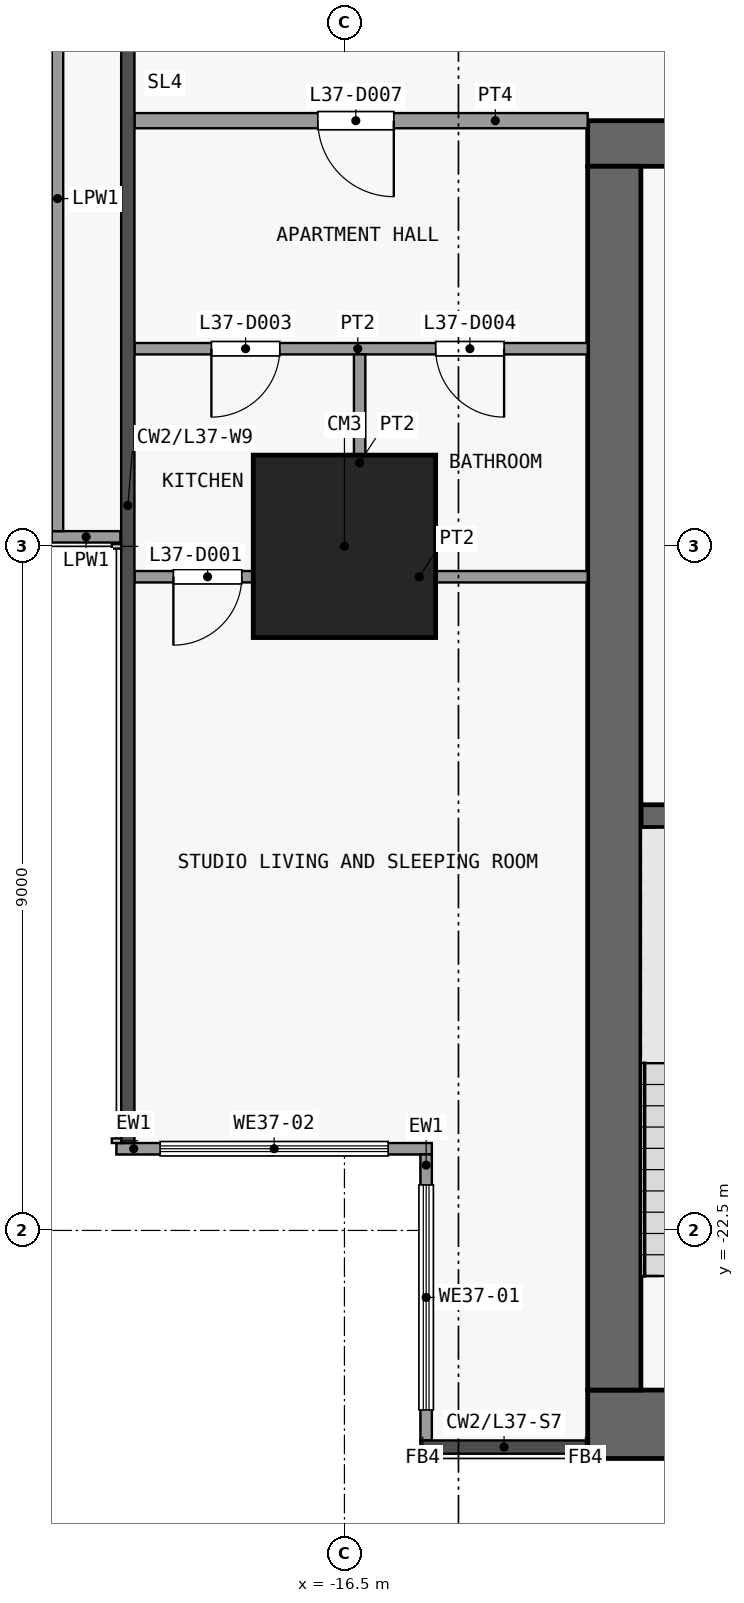
"""IFC4 building model, lengths in metres.
Left out: names, types, materials, properties, quantities, classifications, styles, units other than length and angle.
Written with IfcOpenShell. Run it as: python <this file> out.ifc"""

import sys

from ifc_helpers import new_model, si_unit, direction, frame, frame_2d, origin, origin_2d, place, context, subcontext, project, spatial, rectangle, extrude, element, fill, save


model = new_model("IFC4")
c1 = context("Model", 3, precision=1e-05, world=origin(), true_north=direction((0.0, 1.0)))
c2 = subcontext(c1, "Body", "Model", "MODEL_VIEW")
j1 = project(units=[si_unit("LENGTHUNIT", "METRE"), si_unit("PLANEANGLEUNIT", "RADIAN")], contexts=[c1])
p1 = place(None, origin())
s1 = spatial("IfcSite", under=j1, at=p1, CompositionType="ELEMENT")
p2 = place(p1, origin())
s2 = spatial("IfcBuilding", under=s1, at=p2, CompositionType="ELEMENT")
p3 = place(p2, frame((0.0, 0.0, 152.9)))
s3 = spatial("IfcBuildingStorey", under=s2, at=p3, CompositionType="ELEMENT", Elevation=152.9)
p4 = place(p3, frame((-16.5, -13.5, 0.0), z_axis=(0.0, 0.0, 1.0), x_axis=(1.0, 0.0, 0.0)))
e1 = element("IfcColumn", 1, at=p4, inside=s3, PredefinedType="COLUMN", context=c2, shape_type="SweptSolid", body=[
    extrude(rectangle(XDim=2.4, YDim=2.4, at=origin_2d()), origin(), (0.0, 0.0, 1.0), 3.6),
])
p5 = place(p3, frame((-13.3, -25.05, 0.0), z_axis=(0.0, 0.0, 1.0), x_axis=(1.0, 0.0, 0.0)))
e2 = element("IfcWall", 2, at=p5, inside=s3, PredefinedType="SHEAR", context=c2, shape_type="SweptSolid", body=[
    extrude(rectangle(XDim=26.6, YDim=0.9, at=frame_2d((13.3, 0.0))), origin(), (0.0, 0.0, 1.0), 3.3),
])
p6 = place(p3, frame((-13.3, -8.2, 0.0), z_axis=(0.0, 0.0, 1.0), x_axis=(1.0, 0.0, 0.0)))
e3 = element("IfcWall", 3, at=p6, inside=s3, PredefinedType="SHEAR", context=c2, shape_type="SweptSolid", body=[
    extrude(rectangle(XDim=26.6, YDim=0.6, at=frame_2d((13.3, 0.0))), origin(), (0.0, 0.0, 1.0), 3.3),
])
p7 = place(p6, frame((7.6, 0.0, 0.0)))
e4 = element("IfcOpeningElement", 4, at=p7, cuts=e3, PredefinedType="OPENING", context=c2, shape_type="SweptSolid", body=[
    extrude(rectangle(XDim=1.8, YDim=2.1, at=frame_2d((0.9, 1.05))), frame((0.0, 0.31, 0.0), z_axis=(0.0, -1.0, 0.0), x_axis=(1.0, 0.0, 0.0)), (0.0, 0.0, 1.0), 0.62),
])
p8 = place(p6, frame((17.2, 0.0, 0.0)))
e5 = element("IfcOpeningElement", 5, at=p8, cuts=e3, PredefinedType="OPENING", context=c2, shape_type="SweptSolid", body=[
    extrude(rectangle(XDim=1.8, YDim=2.1, at=frame_2d((0.9, 1.05))), frame((0.0, 0.31, 0.0), z_axis=(0.0, -1.0, 0.0), x_axis=(1.0, 0.0, 0.0)), (0.0, 0.0, 1.0), 0.62),
])
p9 = place(p6, frame((1.525, 0.0, 0.0)))
e6 = element("IfcOpeningElement", 6, at=p9, cuts=e3, PredefinedType="OPENING", context=c2, shape_type="SweptSolid", body=[
    extrude(rectangle(XDim=1.2, YDim=2.1, at=frame_2d((0.6, 1.05))), frame((0.0, 0.31, 0.0), z_axis=(0.0, -1.0, 0.0), x_axis=(1.0, 0.0, 0.0)), (0.0, 0.0, 1.0), 0.62),
])
p10 = place(p6, frame((23.175, 0.0, 0.0)))
e7 = element("IfcOpeningElement", 7, at=p10, cuts=e3, PredefinedType="OPENING", context=c2, shape_type="SweptSolid", body=[
    extrude(rectangle(XDim=0.9, YDim=2.1, at=frame_2d((0.45, 1.05))), frame((0.0, 0.31, 0.0), z_axis=(0.0, -1.0, 0.0), x_axis=(1.0, 0.0, 0.0)), (0.0, 0.0, 1.0), 0.62),
])
p11 = place(p3, frame((-12.95, -24.6, 0.0), z_axis=(0.0, 0.0, 1.0), x_axis=(0.0, 1.0, 0.0)))
e8 = element("IfcWall", 8, at=p11, inside=s3, PredefinedType="SHEAR", context=c2, shape_type="SweptSolid", body=[
    extrude(rectangle(XDim=16.1, YDim=0.7, at=frame_2d((8.05, 0.0))), origin(), (0.0, 0.0, 1.0), 3.3),
])
p12 = place(p3, frame((-12.6, -17.05, 0.0), z_axis=(0.0, 0.0, 1.0), x_axis=(1.0, 0.0, 0.0)))
e9 = element("IfcWall", 9, at=p12, inside=s3, PredefinedType="SHEAR", context=c2, shape_type="SweptSolid", body=[
    extrude(rectangle(XDim=3.1, YDim=0.3, at=frame_2d((1.55, 0.0))), origin(), (0.0, 0.0, 1.0), 3.3),
])
p13 = place(p3, frame((-15.425, -25.262, 0.0), z_axis=(0.0, 0.0, 1.0), x_axis=(0.0, 1.0, 0.0)))
e10 = element("IfcWall", 10, at=p13, inside=s3, PredefinedType="SOLIDWALL", context=c2, shape_type="SweptSolid", body=[
    extrude(rectangle(XDim=3.762, YDim=0.15, at=frame_2d((1.881, 0.0))), origin(), (0.0, 0.0, 1.0), 3.3),
])
p14 = place(p13, frame((0.401, 0.0, 0.9)))
e11 = element("IfcOpeningElement", 11, at=p14, cuts=e10, PredefinedType="OPENING", context=c2, shape_type="SweptSolid", body=[
    extrude(rectangle(XDim=2.96, YDim=2.4, at=frame_2d((1.48, 1.2))), frame((0.0, 0.085, 0.0), z_axis=(0.0, -1.0, 0.0), x_axis=(1.0, 0.0, 0.0)), (0.0, 0.0, 1.0), 0.17),
])
p15 = place(p3, frame((-15.35, -21.425, 0.0), z_axis=(0.0, 0.0, 1.0), x_axis=(-1.0, 0.0, 0.0)))
e12 = element("IfcWall", 12, at=p15, inside=s3, PredefinedType="SOLIDWALL", context=c2, shape_type="SweptSolid", body=[
    extrude(rectangle(XDim=4.15, YDim=0.15, at=frame_2d((2.075, 0.0))), origin(), (0.0, 0.0, 1.0), 3.3),
])
p16 = place(p15, frame((0.575, 0.0, 0.9)))
e13 = element("IfcOpeningElement", 13, at=p16, cuts=e12, PredefinedType="OPENING", context=c2, shape_type="SweptSolid", body=[
    extrude(rectangle(XDim=3.0, YDim=2.4, at=frame_2d((1.5, 1.2))), frame((0.0, 0.085, 0.0), z_axis=(0.0, -1.0, 0.0), x_axis=(1.0, 0.0, 0.0)), (0.0, 0.0, 1.0), 0.17),
])
p17 = place(p3, frame((-19.448, -13.375, 0.0), z_axis=(0.0, 0.0, 1.0), x_axis=(-1.0, 0.0, 0.0)))
e14 = element("IfcWall", 14, at=p17, inside=s3, PredefinedType="PARAPET", context=c2, shape_type="SweptSolid", body=[
    extrude(rectangle(XDim=0.903, YDim=0.15, at=frame_2d((0.451, 0.0))), origin(), (0.0, 0.0, 1.0), 1.15),
])
p18 = place(p3, frame((-20.275, -13.3, 0.0), z_axis=(0.0, 0.0, 1.0), x_axis=(0.0, 1.0, 0.0)))
e15 = element("IfcWall", 15, at=p18, inside=s3, PredefinedType="PARAPET", context=c2, shape_type="SweptSolid", body=[
    extrude(rectangle(XDim=8.75, YDim=0.15, at=frame_2d((4.375, 0.0))), origin(), (0.0, 0.0, 1.0), 1.15),
])
p19 = place(p3, frame((-19.262, -13.9, 0.0), z_axis=(0.0, 0.0, 1.0), x_axis=(1.0, 0.0, 0.0)))
e16 = element("IfcWall", 16, at=p19, inside=s3, PredefinedType="PARTITIONING", context=c2, shape_type="SweptSolid", body=[
    extrude(rectangle(XDim=5.962, YDim=0.15, at=frame_2d((2.981, 0.0))), origin(), (0.0, 0.0, 1.0), 3.3),
])
p20 = place(p19, frame((0.512, 0.0, 0.0)))
e17 = element("IfcOpeningElement", 17, at=p20, cuts=e16, PredefinedType="OPENING", context=c2, shape_type="SweptSolid", body=[
    extrude(rectangle(XDim=0.9, YDim=2.1, at=frame_2d((0.45, 1.05))), frame((0.0, 0.085, 0.0), z_axis=(0.0, -1.0, 0.0), x_axis=(1.0, 0.0, 0.0)), (0.0, 0.0, 1.0), 0.17),
])
p21 = place(p3, frame((-19.262, -10.9, 0.0), z_axis=(0.0, 0.0, 1.0), x_axis=(1.0, 0.0, 0.0)))
e18 = element("IfcWall", 18, at=p21, inside=s3, PredefinedType="PARTITIONING", context=c2, shape_type="SweptSolid", body=[
    extrude(rectangle(XDim=5.962, YDim=0.15, at=frame_2d((2.981, 0.0))), origin(), (0.0, 0.0, 1.0), 3.3),
])
p22 = place(p21, frame((1.012, 0.0, 0.0)))
e19 = element("IfcOpeningElement", 19, at=p22, cuts=e18, PredefinedType="OPENING", context=c2, shape_type="SweptSolid", body=[
    extrude(rectangle(XDim=0.9, YDim=2.1, at=frame_2d((0.45, 1.05))), frame((0.0, 0.085, 0.0), z_axis=(0.0, -1.0, 0.0), x_axis=(1.0, 0.0, 0.0)), (0.0, 0.0, 1.0), 0.17),
])
p23 = place(p21, frame((3.963, 0.0, 0.0)))
e20 = element("IfcOpeningElement", 20, at=p23, cuts=e18, PredefinedType="OPENING", context=c2, shape_type="SweptSolid", body=[
    extrude(rectangle(XDim=0.9, YDim=2.1, at=frame_2d((0.45, 1.05))), frame((0.0, 0.085, 0.0), z_axis=(0.0, -1.0, 0.0), x_axis=(1.0, 0.0, 0.0)), (0.0, 0.0, 1.0), 0.17),
])
p24 = place(p3, frame((-19.262, -7.9, 0.0), z_axis=(0.0, 0.0, 1.0), x_axis=(1.0, 0.0, 0.0)))
e21 = element("IfcWall", 21, at=p24, inside=s3, PredefinedType="PARTITIONING", context=c2, shape_type="SweptSolid", body=[
    extrude(rectangle(XDim=5.962, YDim=0.2, at=frame_2d((2.981, 0.0))), origin(), (0.0, 0.0, 1.0), 3.3),
])
p25 = place(p24, frame((2.412, 0.0, 0.0)))
e22 = element("IfcOpeningElement", 22, at=p25, cuts=e21, PredefinedType="OPENING", context=c2, shape_type="SweptSolid", body=[
    extrude(rectangle(XDim=1.0, YDim=2.1, at=frame_2d((0.5, 1.05))), frame((0.0, 0.11, 0.0), z_axis=(0.0, -1.0, 0.0), x_axis=(1.0, 0.0, 0.0)), (0.0, 0.0, 1.0), 0.22),
])
p26 = place(p3, frame((-16.3, -13.825, 0.0), z_axis=(0.0, 0.0, 1.0), x_axis=(0.0, 1.0, 0.0)))
e23 = element("IfcWall", 23, at=p26, inside=s3, PredefinedType="PARTITIONING", context=c2, shape_type="SweptSolid", body=[
    extrude(rectangle(XDim=2.85, YDim=0.15, at=frame_2d((1.425, 0.0))), origin(), (0.0, 0.0, 1.0), 3.3),
])
p27 = place(p14, origin())
e24 = element("IfcWindow", 24, at=p27, inside=s3, PartitioningType="SINGLE_PANEL", PredefinedType="WINDOW", context=c2, shape_type="SweptSolid", body=[
    extrude(rectangle(XDim=2.96, YDim=2.4, at=frame_2d((1.48, 1.2))), frame((0.0, 0.03, 0.0), z_axis=(0.0, -1.0, 0.0), x_axis=(1.0, 0.0, 0.0)), (0.0, 0.0, 1.0), 0.06),
])
fill(e11, e24)
p28 = place(p16, origin())
e25 = element("IfcWindow", 25, at=p28, inside=s3, PartitioningType="SINGLE_PANEL", PredefinedType="WINDOW", context=c2, shape_type="SweptSolid", body=[
    extrude(rectangle(XDim=3.0, YDim=2.4, at=frame_2d((1.5, 1.2))), frame((0.0, 0.03, 0.0), z_axis=(0.0, -1.0, 0.0), x_axis=(1.0, 0.0, 0.0)), (0.0, 0.0, 1.0), 0.06),
])
fill(e13, e25)
p29 = place(p20, origin())
e26 = element("IfcDoor", 26, at=p29, inside=s3, OperationType="SINGLE_SWING_LEFT", PredefinedType="DOOR", context=c2, shape_type="SweptSolid", body=[
    extrude(rectangle(XDim=0.9, YDim=2.1, at=frame_2d((0.45, 1.05))), frame((0.0, 0.025, 0.0), z_axis=(0.0, -1.0, 0.0), x_axis=(1.0, 0.0, 0.0)), (0.0, 0.0, 1.0), 0.05),
])
fill(e17, e26)
p30 = place(p22, origin())
e27 = element("IfcDoor", 27, at=p30, inside=s3, OperationType="SINGLE_SWING_LEFT", PredefinedType="DOOR", context=c2, shape_type="SweptSolid", body=[
    extrude(rectangle(XDim=0.9, YDim=2.1, at=frame_2d((0.45, 1.05))), frame((0.0, 0.025, 0.0), z_axis=(0.0, -1.0, 0.0), x_axis=(1.0, 0.0, 0.0)), (0.0, 0.0, 1.0), 0.05),
])
fill(e19, e27)
p31 = place(p23, origin())
e28 = element("IfcDoor", 28, at=p31, inside=s3, OperationType="SINGLE_SWING_RIGHT", PredefinedType="DOOR", context=c2, shape_type="SweptSolid", body=[
    extrude(rectangle(XDim=0.9, YDim=2.1, at=frame_2d((0.45, 1.05))), frame((0.0, 0.025, 0.0), z_axis=(0.0, -1.0, 0.0), x_axis=(1.0, 0.0, 0.0)), (0.0, 0.0, 1.0), 0.05),
])
fill(e20, e28)
p32 = place(p25, origin())
e29 = element("IfcDoor", 29, at=p32, inside=s3, OperationType="SINGLE_SWING_RIGHT", PredefinedType="DOOR", context=c2, shape_type="SweptSolid", body=[
    extrude(rectangle(XDim=1.0, YDim=2.1, at=frame_2d((0.5, 1.05))), frame((0.0, 0.025, 0.0), z_axis=(0.0, -1.0, 0.0), x_axis=(1.0, 0.0, 0.0)), (0.0, 0.0, 1.0), 0.05),
])
fill(e22, e29)
save(model, sys.argv[1])
